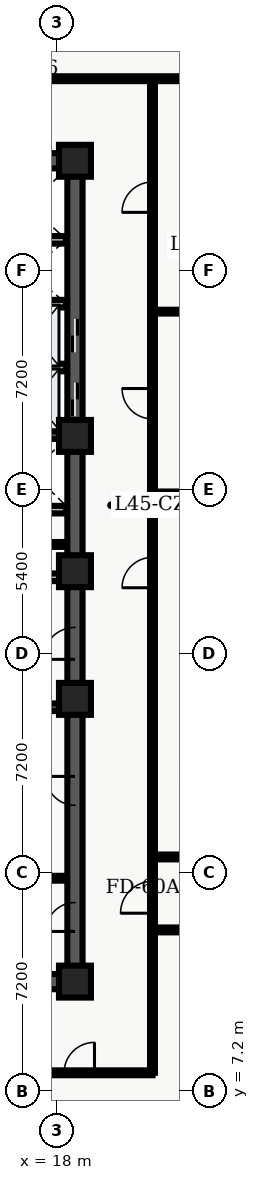
"""IFC4 building model, lengths in metres.
Left out: names, types, materials, properties, quantities, classifications, styles, units other than length and angle.
Written with IfcOpenShell. Run it as: python <this file> out.ifc"""

import sys

from ifc_helpers import new_model, entity, si_unit, converted_unit, direction, frame, origin_with_axes, origin_2d_with_axis, place, context, subcontext, project, spatial, polyline, rectangle, outline, extrude, element, fill, save


model = new_model("IFC4")
c1 = context("Model", 3, precision=1e-05, world=origin_with_axes(), true_north=direction((0.0, 1.0)))
c2 = subcontext(c1, "Body", "Model", "MODEL_VIEW")
j1 = project(units=[si_unit("LENGTHUNIT", "METRE"), converted_unit("PLANEANGLEUNIT", "DEGREE", entity("IfcPlaneAngleMeasure", 0.017), si_unit("PLANEANGLEUNIT", "RADIAN"), dimensions=[0, 0, 0, 0, 0, 0, 0])], contexts=[c1])
p1 = place(None, origin_with_axes())
s1 = spatial("IfcSite", under=j1, at=p1, CompositionType="ELEMENT")
p2 = place(p1, origin_with_axes())
s2 = spatial("IfcBuilding", under=s1, at=p2, CompositionType="ELEMENT")
p3 = place(p2, frame((0.0, 0.0, 183.6), z_axis=(0.0, 0.0, 1.0), x_axis=(1.0, 0.0, 0.0)))
s3 = spatial("IfcBuildingStorey", under=s2, at=p3, CompositionType="ELEMENT", Elevation=183.6)
p4 = place(p3, frame((11.4, 10.8, 0.0), z_axis=(0.0, 0.0, 1.0), x_axis=(1.0, 0.0, 0.0)))
e1 = element("IfcWall", 1, at=p4, inside=s3, PredefinedType="SHEAR", context=c2, shape_type="SweptSolid", body=[
    extrude(outline(polyline([(0.0, -0.25), (7.2, -0.25), (7.2, 0.25), (0.0, 0.25), (0.0, -0.25)])), origin_with_axes(), (0.0, 0.0, 1.0), 3.6),
])
p5 = place(p4, frame((2.625, 0.0, 0.0), z_axis=(0.0, 0.0, 1.0), x_axis=(1.0, 0.0, 0.0)))
e2 = element("IfcOpeningElement", 2, at=p5, cuts=e1, PredefinedType="OPENING", context=c2, shape_type="SweptSolid", body=[
    extrude(rectangle(XDim=1.05, YDim=0.52, at=origin_2d_with_axis()), origin_with_axes(), (0.0, 0.0, 1.0), 2.15),
])
p6 = place(p3, frame((11.4, 37.8, 0.0), z_axis=(0.0, 0.0, 1.0), x_axis=(1.0, 0.0, 0.0)))
e3 = element("IfcWall", 3, at=p6, inside=s3, PredefinedType="SHEAR", context=c2, shape_type="SweptSolid", body=[
    extrude(outline(polyline([(0.0, -0.25), (7.2, -0.25), (7.2, 0.25), (0.0, 0.25), (0.0, -0.25)])), origin_with_axes(), (0.0, 0.0, 1.0), 3.6),
])
p7 = place(p6, frame((2.625, 0.0, 0.0), z_axis=(0.0, 0.0, 1.0), x_axis=(1.0, 0.0, 0.0)))
e4 = element("IfcOpeningElement", 4, at=p7, cuts=e3, PredefinedType="OPENING", context=c2, shape_type="SweptSolid", body=[
    extrude(rectangle(XDim=1.05, YDim=0.52, at=origin_2d_with_axis()), origin_with_axes(), (0.0, 0.0, 1.0), 2.15),
])
p8 = place(p3, frame((18.6, 10.8, 0.0), z_axis=(0.0, 0.0, 1.0), x_axis=(0.0, 1.0, 0.0)))
e5 = element("IfcWall", 5, at=p8, inside=s3, PredefinedType="SHEAR", context=c2, shape_type="SweptSolid", body=[
    extrude(outline(polyline([(0.0, -0.25), (13.5, -0.25), (13.5, 0.25), (0.0, 0.25), (0.0, -0.25)])), origin_with_axes(), (0.0, 0.0, 1.0), 3.6),
])
p9 = place(p8, frame((11.125, 0.0, 0.0), z_axis=(0.0, 0.0, 1.0), x_axis=(1.0, 0.0, 0.0)))
e6 = element("IfcOpeningElement", 6, at=p9, cuts=e5, PredefinedType="OPENING", context=c2, shape_type="SweptSolid", body=[
    extrude(rectangle(XDim=1.05, YDim=0.52, at=origin_2d_with_axis()), origin_with_axes(), (0.0, 0.0, 1.0), 2.15),
])
p10 = place(p8, frame((2.125, 0.0, 0.0), z_axis=(0.0, 0.0, 1.0), x_axis=(1.0, 0.0, 0.0)))
e7 = element("IfcOpeningElement", 7, at=p10, cuts=e5, PredefinedType="OPENING", context=c2, shape_type="SweptSolid", body=[
    extrude(rectangle(XDim=0.95, YDim=0.52, at=origin_2d_with_axis()), origin_with_axes(), (0.0, 0.0, 1.0), 2.15),
])
p11 = place(p8, frame((6.275, 0.0, 0.0), z_axis=(0.0, 0.0, 1.0), x_axis=(1.0, 0.0, 0.0)))
e8 = element("IfcOpeningElement", 8, at=p11, cuts=e5, PredefinedType="OPENING", context=c2, shape_type="SweptSolid", body=[
    extrude(rectangle(XDim=0.95, YDim=0.52, at=origin_2d_with_axis()), origin_with_axes(), (0.0, 0.0, 1.0), 2.15),
])
p12 = place(p3, frame((18.6, 24.3, 0.0), z_axis=(0.0, 0.0, 1.0), x_axis=(0.0, 1.0, 0.0)))
e9 = element("IfcWall", 9, at=p12, inside=s3, PredefinedType="SHEAR", context=c2, shape_type="SweptSolid", body=[
    extrude(outline(polyline([(0.0, -0.25), (13.5, -0.25), (13.5, 0.25), (0.0, 0.25), (0.0, -0.25)])), origin_with_axes(), (0.0, 0.0, 1.0), 3.6),
])
p13 = place(p12, frame((5.65, 0.0, 0.0), z_axis=(0.0, 0.0, 1.0), x_axis=(1.0, 0.0, 0.0)))
e10 = element("IfcOpeningElement", 10, at=p13, cuts=e9, PredefinedType="OPENING", context=c2, shape_type="SweptSolid", body=[
    extrude(rectangle(XDim=1.1, YDim=0.52, at=origin_2d_with_axis()), origin_with_axes(), (0.0, 0.0, 1.0), 2.15),
])
p14 = place(p12, frame((7.75, 0.0, 0.0), z_axis=(0.0, 0.0, 1.0), x_axis=(1.0, 0.0, 0.0)))
e11 = element("IfcOpeningElement", 11, at=p14, cuts=e9, PredefinedType="OPENING", context=c2, shape_type="SweptSolid", body=[
    extrude(rectangle(XDim=1.1, YDim=0.52, at=origin_2d_with_axis()), origin_with_axes(), (0.0, 0.0, 1.0), 2.15),
])
for number, where, z_axis, x_axis in (
    (12, (11.65, 19.825, 0.0), (0.0, 0.0, 1.0), (1.0, 0.0, 0.0)),
    (13, (11.65, 28.775, 0.0), (0.0, 0.0, 1.0), (1.0, 0.0, 0.0)),
):
    element("IfcWall", number, at=place(p3, frame(where, z_axis=z_axis, x_axis=x_axis)), inside=s3, PredefinedType="SHEAR", context=c2, shape_type="SweptSolid", body=[
        extrude(outline(polyline([(0.0, -0.125), (6.7, -0.125), (6.7, 0.125), (0.0, 0.125), (0.0, -0.125)])), origin_with_axes(), (0.0, 0.0, 1.0), 3.6),
    ])
p15 = place(p3, frame((11.7, 24.1, 0.0), z_axis=(0.0, 0.0, 1.0), x_axis=(1.0, 0.0, 0.0)))
e14 = element("IfcWall", 14, at=p15, inside=s3, PredefinedType="SOLIDWALL", context=c2, shape_type="SweptSolid", body=[
    extrude(outline(polyline([(0.0, -0.125), (6.6, -0.125), (6.6, 0.125), (0.0, 0.125), (0.0, -0.125)])), origin_with_axes(), (0.0, 0.0, 1.0), 2.64),
])
p16 = place(p15, frame((3.75, 0.0, 0.0), z_axis=(0.0, 0.0, 1.0), x_axis=(1.0, 0.0, 0.0)))
e15 = element("IfcOpeningElement", 15, at=p16, cuts=e14, PredefinedType="OPENING", context=c2, shape_type="SweptSolid", body=[
    extrude(rectangle(XDim=0.9, YDim=0.27, at=origin_2d_with_axis()), origin_with_axes(), (0.0, 0.0, 1.0), 2.15),
])
p17 = place(p3, frame((11.7, 26.325, 0.0), z_axis=(0.0, 0.0, 1.0), x_axis=(1.0, 0.0, 0.0)))
e16 = element("IfcWall", 16, at=p17, inside=s3, PredefinedType="SOLIDWALL", context=c2, shape_type="SweptSolid", body=[
    extrude(outline(polyline([(0.0, -0.125), (6.6, -0.125), (6.6, 0.125), (0.0, 0.125), (0.0, -0.125)])), origin_with_axes(), (0.0, 0.0, 1.0), 2.64),
])
p18 = place(p17, frame((3.5, 0.0, 0.0), z_axis=(0.0, 0.0, 1.0), x_axis=(1.0, 0.0, 0.0)))
e17 = element("IfcOpeningElement", 17, at=p18, cuts=e16, PredefinedType="OPENING", context=c2, shape_type="SweptSolid", body=[
    extrude(rectangle(XDim=0.9, YDim=0.27, at=origin_2d_with_axis()), origin_with_axes(), (0.0, 0.0, 1.0), 2.15),
])
for number, where, z_axis, x_axis in (
    (18, (18.6, 10.8, 0.0), (0.0, 0.0, 1.0), (1.0, 0.0, 0.0)),
    (19, (18.6, 20.1, 0.0), (0.0, 0.0, 1.0), (1.0, 0.0, 0.0)),
    (20, (18.6, 24.3, 0.0), (0.0, 0.0, 1.0), (1.0, 0.0, 0.0)),
    (21, (18.6, 28.75, 0.0), (0.0, 0.0, 1.0), (1.0, 0.0, 0.0)),
    (22, (18.6, 37.8, 0.0), (0.0, 0.0, 1.0), (1.0, 0.0, 0.0)),
):
    element("IfcColumn", number, at=place(p3, frame(where, z_axis=z_axis, x_axis=x_axis)), inside=s3, PredefinedType="COLUMN", context=c2, shape_type="SweptSolid", body=[
        extrude(rectangle(XDim=1.05, YDim=1.05, at=origin_2d_with_axis()), origin_with_axes(), (0.0, 0.0, 1.0), 3.9),
    ])
p19 = place(p3, frame((14.62, 25.18, 0.0), z_axis=(0.0, 0.0, 1.0), x_axis=(1.0, 0.0, 0.0)))
e23 = element("IfcWall", 23, at=p19, inside=s3, PredefinedType="PARTITIONING", context=c2, shape_type="SweptSolid", body=[
    extrude(outline(polyline([(0.0, -0.08), (3.68, -0.08), (3.68, 0.08), (0.0, 0.08), (0.0, -0.08)])), origin_with_axes(), (0.0, 0.0, 1.0), 2.64),
])
p20 = place(p19, frame((1.95, 0.0, 0.0), z_axis=(0.0, 0.0, 1.0), x_axis=(1.0, 0.0, 0.0)))
e24 = element("IfcOpeningElement", 24, at=p20, cuts=e23, PredefinedType="OPENING", context=c2, shape_type="SweptSolid", body=[
    extrude(rectangle(XDim=0.9, YDim=0.18, at=origin_2d_with_axis()), origin_with_axes(), (0.0, 0.0, 1.0), 2.15),
])
p21 = place(p3, frame((15.84, 14.2, 0.0), z_axis=(0.0, 0.0, 1.0), x_axis=(1.0, 0.0, 0.0)))
e25 = element("IfcWall", 25, at=p21, inside=s3, PredefinedType="PARTITIONING", context=c2, shape_type="SweptSolid", body=[
    extrude(outline(polyline([(0.0, -0.08), (2.46, -0.08), (2.46, 0.08), (0.0, 0.08), (0.0, -0.08)])), origin_with_axes(), (0.0, 0.0, 1.0), 2.64),
])
for number, where, z_axis, x_axis in (
    (26, (15.84, 31.0, 0.0), (0.0, 0.0, 1.0), (1.0, 0.0, 0.0)),
    (27, (15.84, 33.1, 0.0), (0.0, 0.0, 1.0), (1.0, 0.0, 0.0)),
    (28, (15.84, 35.2, 0.0), (0.0, 0.0, 1.0), (1.0, 0.0, 0.0)),
):
    element("IfcWall", number, at=place(p3, frame(where, z_axis=z_axis, x_axis=x_axis)), inside=s3, PredefinedType="SOLIDWALL", context=c2, shape_type="SweptSolid", body=[
        extrude(outline(polyline([(0.0, -0.125), (2.46, -0.125), (2.46, 0.125), (0.0, 0.125), (0.0, -0.125)])), origin_with_axes(), (0.0, 0.0, 1.0), 2.64),
    ])
p22 = place(p3, frame((2.6, 7.8, 0.0), z_axis=(0.0, 0.0, 1.0), x_axis=(1.0, 0.0, 0.0)))
e29 = element("IfcWall", 29, at=p22, inside=s3, PredefinedType="PARTITIONING", context=c2, shape_type="SweptSolid", body=[
    extrude(outline(polyline([(0.0, -0.08), (18.55, -0.08), (18.55, 0.08), (0.0, 0.08), (0.0, -0.08)])), origin_with_axes(), (0.0, 0.0, 1.0), 2.64),
])
p23 = place(p22, frame((2.569, 0.0, 0.0), z_axis=(0.0, 0.0, 1.0), x_axis=(1.0, 0.0, 0.0)))
e30 = element("IfcOpeningElement", 30, at=p23, cuts=e29, PredefinedType="OPENING", context=c2, shape_type="SweptSolid", body=[
    extrude(rectangle(XDim=1.0, YDim=0.18, at=origin_2d_with_axis()), origin_with_axes(), (0.0, 0.0, 1.0), 2.15),
])
p24 = place(p22, frame((7.534, 0.0, 0.0), z_axis=(0.0, 0.0, 1.0), x_axis=(1.0, 0.0, 0.0)))
e31 = element("IfcOpeningElement", 31, at=p24, cuts=e29, PredefinedType="OPENING", context=c2, shape_type="SweptSolid", body=[
    extrude(rectangle(XDim=1.0, YDim=0.18, at=origin_2d_with_axis()), origin_with_axes(), (0.0, 0.0, 1.0), 2.15),
])
p25 = place(p22, frame((11.293, 0.0, 0.0), z_axis=(0.0, 0.0, 1.0), x_axis=(1.0, 0.0, 0.0)))
e32 = element("IfcOpeningElement", 32, at=p25, cuts=e29, PredefinedType="OPENING", context=c2, shape_type="SweptSolid", body=[
    extrude(rectangle(XDim=1.0, YDim=0.18, at=origin_2d_with_axis()), origin_with_axes(), (0.0, 0.0, 1.0), 2.15),
])
p26 = place(p22, frame((16.142, 0.0, 0.0), z_axis=(0.0, 0.0, 1.0), x_axis=(1.0, 0.0, 0.0)))
e33 = element("IfcOpeningElement", 33, at=p26, cuts=e29, PredefinedType="OPENING", context=c2, shape_type="SweptSolid", body=[
    extrude(rectangle(XDim=1.0, YDim=0.18, at=origin_2d_with_axis()), origin_with_axes(), (0.0, 0.0, 1.0), 2.15),
])
p27 = place(p3, frame((2.6, 40.5, 0.0), z_axis=(0.0, 0.0, 1.0), x_axis=(1.0, 0.0, 0.0)))
e34 = element("IfcWall", 34, at=p27, inside=s3, PredefinedType="PARTITIONING", context=c2, shape_type="SweptSolid", body=[
    extrude(outline(polyline([(0.0, -0.08), (23.459, -0.08), (23.459, 0.08), (0.0, 0.08), (0.0, -0.08)])), origin_with_axes(), (0.0, 0.0, 1.0), 2.64),
])
p28 = place(p27, frame((2.422, 0.0, 0.0), z_axis=(0.0, 0.0, 1.0), x_axis=(1.0, 0.0, 0.0)))
e35 = element("IfcOpeningElement", 35, at=p28, cuts=e34, PredefinedType="OPENING", context=c2, shape_type="SweptSolid", body=[
    extrude(rectangle(XDim=1.0, YDim=0.18, at=origin_2d_with_axis()), origin_with_axes(), (0.0, 0.0, 1.0), 2.15),
])
p29 = place(p27, frame((7.756, 0.0, 0.0), z_axis=(0.0, 0.0, 1.0), x_axis=(1.0, 0.0, 0.0)))
e36 = element("IfcOpeningElement", 36, at=p29, cuts=e34, PredefinedType="OPENING", context=c2, shape_type="SweptSolid", body=[
    extrude(rectangle(XDim=1.0, YDim=0.18, at=origin_2d_with_axis()), origin_with_axes(), (0.0, 0.0, 1.0), 2.15),
])
p30 = place(p27, frame((14.089, 0.0, 0.0), z_axis=(0.0, 0.0, 1.0), x_axis=(1.0, 0.0, 0.0)))
e37 = element("IfcOpeningElement", 37, at=p30, cuts=e34, PredefinedType="OPENING", context=c2, shape_type="SweptSolid", body=[
    extrude(rectangle(XDim=1.2, YDim=0.18, at=origin_2d_with_axis()), origin_with_axes(), (0.0, 0.0, 1.0), 2.2),
])
p31 = place(p3, frame((21.15, 7.8, 0.0), z_axis=(0.0, 0.0, 1.0), x_axis=(0.0, 1.0, 0.0)))
e38 = element("IfcWall", 38, at=p31, inside=s3, PredefinedType="PARTITIONING", context=c2, shape_type="SweptSolid", body=[
    extrude(outline(polyline([(0.0, -0.08), (32.7, -0.08), (32.7, 0.08), (0.0, 0.08), (0.0, -0.08)])), origin_with_axes(), (0.0, 0.0, 1.0), 2.64),
])
p32 = place(p31, frame((16.456, 0.0, 0.0), z_axis=(0.0, 0.0, 1.0), x_axis=(1.0, 0.0, 0.0)))
e39 = element("IfcOpeningElement", 39, at=p32, cuts=e38, PredefinedType="OPENING", context=c2, shape_type="SweptSolid", body=[
    extrude(rectangle(XDim=1.0, YDim=0.18, at=origin_2d_with_axis()), origin_with_axes(), (0.0, 0.0, 1.0), 2.15),
])
p33 = place(p31, frame((22.009, 0.0, 0.0), z_axis=(0.0, 0.0, 1.0), x_axis=(1.0, 0.0, 0.0)))
e40 = element("IfcOpeningElement", 40, at=p33, cuts=e38, PredefinedType="OPENING", context=c2, shape_type="SweptSolid", body=[
    extrude(rectangle(XDim=1.0, YDim=0.18, at=origin_2d_with_axis()), origin_with_axes(), (0.0, 0.0, 1.0), 2.15),
])
p34 = place(p31, frame((28.803, 0.0, 0.0), z_axis=(0.0, 0.0, 1.0), x_axis=(1.0, 0.0, 0.0)))
e41 = element("IfcOpeningElement", 41, at=p34, cuts=e38, PredefinedType="OPENING", context=c2, shape_type="SweptSolid", body=[
    extrude(rectangle(XDim=1.0, YDim=0.18, at=origin_2d_with_axis()), origin_with_axes(), (0.0, 0.0, 1.0), 2.15),
])
p35 = place(p31, frame((5.775, 0.0, 0.0), z_axis=(0.0, 0.0, 1.0), x_axis=(1.0, 0.0, 0.0)))
e42 = element("IfcOpeningElement", 42, at=p35, cuts=e38, PredefinedType="OPENING", context=c2, shape_type="SweptSolid", body=[
    extrude(rectangle(XDim=1.05, YDim=0.18, at=origin_2d_with_axis()), origin_with_axes(), (0.0, 0.0, 1.0), 2.15),
])
p36 = place(p3, frame((21.3, 26.781, 0.0), z_axis=(0.0, 0.0, 1.0), x_axis=(1.0, 0.0, 0.0)))
e43 = element("IfcWall", 43, at=p36, inside=s3, PredefinedType="PARTITIONING", context=c2, shape_type="SweptSolid", body=[
    extrude(outline(polyline([(0.0, -0.14), (4.759, -0.14), (4.759, 0.14), (0.0, 0.14), (0.0, -0.14)])), origin_with_axes(), (0.0, 0.0, 1.0), 2.64),
])
p37 = place(p3, frame((21.3, 32.837, 0.0), z_axis=(0.0, 0.0, 1.0), x_axis=(1.0, 0.0, 0.0)))
e44 = element("IfcWall", 44, at=p37, inside=s3, PredefinedType="PARTITIONING", context=c2, shape_type="SweptSolid", body=[
    extrude(outline(polyline([(0.0, -0.062), (4.759, -0.062), (4.759, 0.062), (0.0, 0.062), (0.0, -0.062)])), origin_with_axes(), (0.0, 0.0, 1.0), 2.64),
])
p38 = place(p3, frame((21.15, 12.5, 0.0), z_axis=(0.0, 0.0, 1.0), x_axis=(1.0, 0.0, 0.0)))
e45 = element("IfcWall", 45, at=p38, inside=s3, PredefinedType="PARTITIONING", context=c2, shape_type="SweptSolid", body=[
    extrude(outline(polyline([(0.0, -0.08), (15.2, -0.08), (15.2, 0.08), (0.0, 0.08), (0.0, -0.08)])), origin_with_axes(), (0.0, 0.0, 1.0), 2.64),
])
p39 = place(p38, frame((1.951, 0.0, 0.0), z_axis=(0.0, 0.0, 1.0), x_axis=(1.0, 0.0, 0.0)))
e46 = element("IfcOpeningElement", 46, at=p39, cuts=e45, PredefinedType="OPENING", context=c2, shape_type="SweptSolid", body=[
    extrude(rectangle(XDim=1.0, YDim=0.18, at=origin_2d_with_axis()), origin_with_axes(), (0.0, 0.0, 1.0), 2.15),
])
p40 = place(p38, frame((5.086, 0.0, 0.0), z_axis=(0.0, 0.0, 1.0), x_axis=(1.0, 0.0, 0.0)))
e47 = element("IfcOpeningElement", 47, at=p40, cuts=e45, PredefinedType="OPENING", context=c2, shape_type="SweptSolid", body=[
    extrude(rectangle(XDim=1.0, YDim=0.18, at=origin_2d_with_axis()), origin_with_axes(), (0.0, 0.0, 1.0), 2.15),
])
p41 = place(p38, frame((9.28, 0.0, 0.0), z_axis=(0.0, 0.0, 1.0), x_axis=(1.0, 0.0, 0.0)))
e48 = element("IfcOpeningElement", 48, at=p41, cuts=e45, PredefinedType="OPENING", context=c2, shape_type="SweptSolid", body=[
    extrude(rectangle(XDim=1.2, YDim=0.18, at=origin_2d_with_axis()), origin_with_axes(), (0.0, 0.0, 1.0), 2.2),
])
p42 = place(p38, frame((13.055, 0.0, 0.0), z_axis=(0.0, 0.0, 1.0), x_axis=(1.0, 0.0, 0.0)))
e49 = element("IfcOpeningElement", 49, at=p42, cuts=e45, PredefinedType="OPENING", context=c2, shape_type="SweptSolid", body=[
    extrude(rectangle(XDim=1.0, YDim=0.18, at=origin_2d_with_axis()), origin_with_axes(), (0.0, 0.0, 1.0), 2.15),
])
p43 = place(p3, frame((21.15, 14.9, 0.0), z_axis=(0.0, 0.0, 1.0), x_axis=(1.0, 0.0, 0.0)))
e50 = element("IfcWall", 50, at=p43, inside=s3, PredefinedType="PARTITIONING", context=c2, shape_type="SweptSolid", body=[
    extrude(outline(polyline([(0.0, -0.08), (15.2, -0.08), (15.2, 0.08), (0.0, 0.08), (0.0, -0.08)])), origin_with_axes(), (0.0, 0.0, 1.0), 2.64),
])
p44 = place(p43, frame((7.65, 0.0, 0.0), z_axis=(0.0, 0.0, 1.0), x_axis=(1.0, 0.0, 0.0)))
e51 = element("IfcOpeningElement", 51, at=p44, cuts=e50, PredefinedType="OPENING", context=c2, shape_type="SweptSolid", body=[
    extrude(rectangle(XDim=1.0, YDim=0.18, at=origin_2d_with_axis()), origin_with_axes(), (0.0, 0.0, 1.0), 2.15),
])
p45 = place(p12, frame((5.65, 0.0, 0.0), z_axis=(0.0, 0.0, 1.0), x_axis=(1.0, 0.0, 0.0)))
e52 = element("IfcDoor", 52, at=p45, inside=s3, OperationType="SLIDING_TO_LEFT", PredefinedType="DOOR", context=c2, shape_type="SweptSolid", body=[
    extrude(rectangle(XDim=1.1, YDim=0.09, at=origin_2d_with_axis()), origin_with_axes(), (0.0, 0.0, 1.0), 2.15),
])
fill(e10, e52)
p46 = place(p12, frame((7.75, 0.0, 0.0), z_axis=(0.0, 0.0, 1.0), x_axis=(1.0, 0.0, 0.0)))
e53 = element("IfcDoor", 53, at=p46, inside=s3, OperationType="SLIDING_TO_RIGHT", PredefinedType="DOOR", context=c2, shape_type="SweptSolid", body=[
    extrude(rectangle(XDim=1.1, YDim=0.09, at=origin_2d_with_axis()), origin_with_axes(), (0.0, 0.0, 1.0), 2.15),
])
fill(e11, e53)
p47 = place(p8, frame((11.125, 0.0, 0.0), z_axis=(0.0, 0.0, 1.0), x_axis=(1.0, 0.0, 0.0)))
e54 = element("IfcDoor", 54, at=p47, inside=s3, OperationType="SINGLE_SWING_LEFT", PredefinedType="DOOR", context=c2, shape_type="SweptSolid", body=[
    extrude(rectangle(XDim=1.05, YDim=0.09, at=origin_2d_with_axis()), origin_with_axes(), (0.0, 0.0, 1.0), 2.15),
])
fill(e6, e54)
p48 = place(p8, frame((2.125, 0.0, 0.0), z_axis=(0.0, 0.0, 1.0), x_axis=(1.0, 0.0, 0.0)))
e55 = element("IfcDoor", 55, at=p48, inside=s3, OperationType="SINGLE_SWING_LEFT", PredefinedType="DOOR", context=c2, shape_type="SweptSolid", body=[
    extrude(rectangle(XDim=0.95, YDim=0.09, at=origin_2d_with_axis()), origin_with_axes(), (0.0, 0.0, 1.0), 2.15),
])
fill(e7, e55)
p49 = place(p8, frame((6.275, 0.0, 0.0), z_axis=(0.0, 0.0, 1.0), x_axis=(1.0, 0.0, 0.0)))
e56 = element("IfcDoor", 56, at=p49, inside=s3, OperationType="SINGLE_SWING_RIGHT", PredefinedType="DOOR", context=c2, shape_type="SweptSolid", body=[
    extrude(rectangle(XDim=0.95, YDim=0.09, at=origin_2d_with_axis()), origin_with_axes(), (0.0, 0.0, 1.0), 2.15),
])
fill(e8, e56)
p50 = place(p22, frame((16.142, 0.0, 0.0), z_axis=(0.0, 0.0, 1.0), x_axis=(1.0, 0.0, 0.0)))
e57 = element("IfcDoor", 57, at=p50, inside=s3, OperationType="SINGLE_SWING_RIGHT", PredefinedType="DOOR", context=c2, shape_type="SweptSolid", body=[
    extrude(rectangle(XDim=1.0, YDim=0.09, at=origin_2d_with_axis()), origin_with_axes(), (0.0, 0.0, 1.0), 2.15),
])
fill(e33, e57)
p51 = place(p31, frame((16.456, 0.0, 0.0), z_axis=(0.0, 0.0, 1.0), x_axis=(1.0, 0.0, 0.0)))
e58 = element("IfcDoor", 58, at=p51, inside=s3, OperationType="SINGLE_SWING_LEFT", PredefinedType="DOOR", context=c2, shape_type="SweptSolid", body=[
    extrude(rectangle(XDim=1.0, YDim=0.09, at=origin_2d_with_axis()), origin_with_axes(), (0.0, 0.0, 1.0), 2.15),
])
fill(e39, e58)
p52 = place(p31, frame((22.009, 0.0, 0.0), z_axis=(0.0, 0.0, 1.0), x_axis=(1.0, 0.0, 0.0)))
e59 = element("IfcDoor", 59, at=p52, inside=s3, OperationType="SINGLE_SWING_RIGHT", PredefinedType="DOOR", context=c2, shape_type="SweptSolid", body=[
    extrude(rectangle(XDim=1.0, YDim=0.09, at=origin_2d_with_axis()), origin_with_axes(), (0.0, 0.0, 1.0), 2.15),
])
fill(e40, e59)
p53 = place(p31, frame((28.803, 0.0, 0.0), z_axis=(0.0, 0.0, 1.0), x_axis=(1.0, 0.0, 0.0)))
e60 = element("IfcDoor", 60, at=p53, inside=s3, OperationType="SINGLE_SWING_LEFT", PredefinedType="DOOR", context=c2, shape_type="SweptSolid", body=[
    extrude(rectangle(XDim=1.0, YDim=0.09, at=origin_2d_with_axis()), origin_with_axes(), (0.0, 0.0, 1.0), 2.15),
])
fill(e41, e60)
p54 = place(p31, frame((5.775, 0.0, 0.0), z_axis=(0.0, 0.0, 1.0), x_axis=(1.0, 0.0, 0.0)))
e61 = element("IfcDoor", 61, at=p54, inside=s3, OperationType="SINGLE_SWING_LEFT", PredefinedType="DOOR", context=c2, shape_type="SweptSolid", body=[
    extrude(rectangle(XDim=1.05, YDim=0.09, at=origin_2d_with_axis()), origin_with_axes(), (0.0, 0.0, 1.0), 2.15),
])
fill(e42, e61)
save(model, sys.argv[1])
